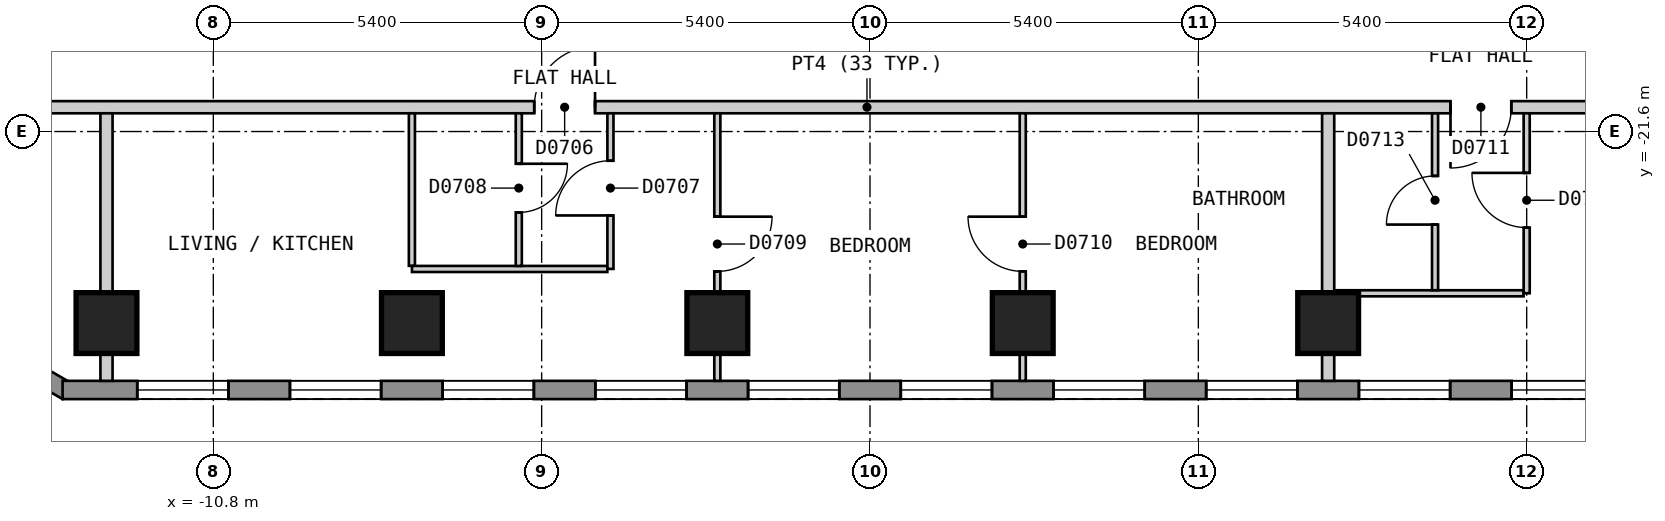
"""IFC4 building model, lengths in metres.
Left out: names, types, materials, properties, quantities, classifications, styles, units other than length and angle.
Written with IfcOpenShell. Run it as: python <this file> out.ifc"""

import sys

from ifc_helpers import new_model, si_unit, direction, frame, frame_2d, origin, origin_2d, place, context, subcontext, project, spatial, polyline, rectangle, outline, extrude, element, fill, save


model = new_model("IFC4")
c1 = context("Model", 3, precision=1e-05, world=origin(), true_north=direction((0.0, 1.0)))
c2 = subcontext(c1, "Body", "Model", "MODEL_VIEW")
j1 = project(units=[si_unit("LENGTHUNIT", "METRE"), si_unit("PLANEANGLEUNIT", "RADIAN")], contexts=[c1])
p1 = place(None, origin())
s1 = spatial("IfcSite", under=j1, at=p1, CompositionType="ELEMENT")
p2 = place(p1, origin())
s2 = spatial("IfcBuilding", under=s1, at=p2, CompositionType="ELEMENT")
p3 = place(p2, frame((0.0, 0.0, 99.0)))
s3 = spatial("IfcBuildingStorey", under=s2, at=p3, CompositionType="ELEMENT", Elevation=99.0)
for number, where, z_axis, x_axis in (
    (1, (-12.557, -24.75, 0.0), (0.0, 0.0, 1.0), (1.0, 0.0, 0.0)),
    (2, (-7.534, -24.75, 0.0), (0.0, 0.0, 1.0), (1.0, 0.0, 0.0)),
    (3, (-2.511, -24.75, 0.0), (0.0, 0.0, 1.0), (1.0, 0.0, 0.0)),
    (4, (2.512, -24.75, 0.0), (0.0, 0.0, 1.0), (1.0, 0.0, 0.0)),
    (5, (7.535, -24.75, 0.0), (0.0, 0.0, 1.0), (1.0, 0.0, 0.0)),
):
    element("IfcColumn", number, at=place(p3, frame(where, z_axis=z_axis, x_axis=x_axis)), inside=s3, PredefinedType="COLUMN", context=c2, shape_type="SweptSolid", body=[
        extrude(rectangle(XDim=1.0, YDim=1.0, at=origin_2d()), origin(), (0.0, 0.0, 1.0), 3.0),
    ])
p4 = place(p3, frame((-17.534, -23.37, 0.0), z_axis=(0.0, 0.0, 1.0), x_axis=(0.866010750942, -0.50002537861, 0.0)))
e6 = element("IfcWall", 6, at=p4, inside=s3, PredefinedType="SOLIDWALL", context=c2, shape_type="SweptSolid", body=[
    extrude(outline(polyline([(0.0, -0.15), (5.0, -0.15), (4.919, 0.15), (0.08, 0.15), (0.0, -0.15)])), origin(), (0.0, 0.0, 1.0), 2.7),
])
p5 = place(p4, frame((0.65, 0.0, 0.15)))
e7 = element("IfcOpeningElement", 7, at=p5, cuts=e6, PredefinedType="OPENING", context=c2, shape_type="SweptSolid", body=[
    extrude(rectangle(XDim=1.2, YDim=2.1, at=frame_2d((0.6, 1.05))), frame((0.0, 0.16, 0.0), z_axis=(0.0, -1.0, 0.0), x_axis=(1.0, 0.0, 0.0)), (0.0, 0.0, 1.0), 0.32),
])
p6 = place(p4, frame((3.15, 0.0, 0.15)))
e8 = element("IfcOpeningElement", 8, at=p6, cuts=e6, PredefinedType="OPENING", context=c2, shape_type="SweptSolid", body=[
    extrude(rectangle(XDim=1.2, YDim=2.1, at=frame_2d((0.6, 1.05))), frame((0.0, 0.16, 0.0), z_axis=(0.0, -1.0, 0.0), x_axis=(1.0, 0.0, 0.0)), (0.0, 0.0, 1.0), 0.32),
])
p7 = place(p3, frame((-13.279, -25.85, 0.0), z_axis=(0.0, 0.0, 1.0), x_axis=(1.0, 0.0, 0.0)))
e9 = element("IfcWall", 9, at=p7, inside=s3, PredefinedType="SOLIDWALL", context=c2, shape_type="SweptSolid", body=[
    extrude(outline(polyline([(0.0, -0.15), (26.558, -0.15), (26.478, 0.15), (0.08, 0.15), (0.0, -0.15)])), origin(), (0.0, 0.0, 1.0), 2.7),
])
p8 = place(p7, frame((1.228, 0.0, 0.15)))
e10 = element("IfcOpeningElement", 10, at=p8, cuts=e9, PredefinedType="OPENING", context=c2, shape_type="SweptSolid", body=[
    extrude(rectangle(XDim=1.5, YDim=2.1, at=frame_2d((0.75, 1.05))), frame((0.0, 0.16, 0.0), z_axis=(0.0, -1.0, 0.0), x_axis=(1.0, 0.0, 0.0)), (0.0, 0.0, 1.0), 0.32),
])
p9 = place(p7, frame((3.739, 0.0, 0.15)))
e11 = element("IfcOpeningElement", 11, at=p9, cuts=e9, PredefinedType="OPENING", context=c2, shape_type="SweptSolid", body=[
    extrude(rectangle(XDim=1.5, YDim=2.1, at=frame_2d((0.75, 1.05))), frame((0.0, 0.16, 0.0), z_axis=(0.0, -1.0, 0.0), x_axis=(1.0, 0.0, 0.0)), (0.0, 0.0, 1.0), 0.32),
])
p10 = place(p7, frame((6.251, 0.0, 0.15)))
e12 = element("IfcOpeningElement", 12, at=p10, cuts=e9, PredefinedType="OPENING", context=c2, shape_type="SweptSolid", body=[
    extrude(rectangle(XDim=1.5, YDim=2.1, at=frame_2d((0.75, 1.05))), frame((0.0, 0.16, 0.0), z_axis=(0.0, -1.0, 0.0), x_axis=(1.0, 0.0, 0.0)), (0.0, 0.0, 1.0), 0.32),
])
p11 = place(p7, frame((8.762, 0.0, 0.15)))
e13 = element("IfcOpeningElement", 13, at=p11, cuts=e9, PredefinedType="OPENING", context=c2, shape_type="SweptSolid", body=[
    extrude(rectangle(XDim=1.5, YDim=2.1, at=frame_2d((0.75, 1.05))), frame((0.0, 0.16, 0.0), z_axis=(0.0, -1.0, 0.0), x_axis=(1.0, 0.0, 0.0)), (0.0, 0.0, 1.0), 0.32),
])
p12 = place(p7, frame((11.274, 0.0, 0.15)))
e14 = element("IfcOpeningElement", 14, at=p12, cuts=e9, PredefinedType="OPENING", context=c2, shape_type="SweptSolid", body=[
    extrude(rectangle(XDim=1.5, YDim=2.1, at=frame_2d((0.75, 1.05))), frame((0.0, 0.16, 0.0), z_axis=(0.0, -1.0, 0.0), x_axis=(1.0, 0.0, 0.0)), (0.0, 0.0, 1.0), 0.32),
])
p13 = place(p7, frame((13.785, 0.0, 0.15)))
e15 = element("IfcOpeningElement", 15, at=p13, cuts=e9, PredefinedType="OPENING", context=c2, shape_type="SweptSolid", body=[
    extrude(rectangle(XDim=1.5, YDim=2.1, at=frame_2d((0.75, 1.05))), frame((0.0, 0.16, 0.0), z_axis=(0.0, -1.0, 0.0), x_axis=(1.0, 0.0, 0.0)), (0.0, 0.0, 1.0), 0.32),
])
p14 = place(p7, frame((16.297, 0.0, 0.15)))
e16 = element("IfcOpeningElement", 16, at=p14, cuts=e9, PredefinedType="OPENING", context=c2, shape_type="SweptSolid", body=[
    extrude(rectangle(XDim=1.5, YDim=2.1, at=frame_2d((0.75, 1.05))), frame((0.0, 0.16, 0.0), z_axis=(0.0, -1.0, 0.0), x_axis=(1.0, 0.0, 0.0)), (0.0, 0.0, 1.0), 0.32),
])
p15 = place(p7, frame((18.808, 0.0, 0.15)))
e17 = element("IfcOpeningElement", 17, at=p15, cuts=e9, PredefinedType="OPENING", context=c2, shape_type="SweptSolid", body=[
    extrude(rectangle(XDim=1.5, YDim=2.1, at=frame_2d((0.75, 1.05))), frame((0.0, 0.16, 0.0), z_axis=(0.0, -1.0, 0.0), x_axis=(1.0, 0.0, 0.0)), (0.0, 0.0, 1.0), 0.32),
])
p16 = place(p7, frame((21.32, 0.0, 0.15)))
e18 = element("IfcOpeningElement", 18, at=p16, cuts=e9, PredefinedType="OPENING", context=c2, shape_type="SweptSolid", body=[
    extrude(rectangle(XDim=1.5, YDim=2.1, at=frame_2d((0.75, 1.05))), frame((0.0, 0.16, 0.0), z_axis=(0.0, -1.0, 0.0), x_axis=(1.0, 0.0, 0.0)), (0.0, 0.0, 1.0), 0.32),
])
p17 = place(p7, frame((23.831, 0.0, 0.15)))
e19 = element("IfcOpeningElement", 19, at=p17, cuts=e9, PredefinedType="OPENING", context=c2, shape_type="SweptSolid", body=[
    extrude(rectangle(XDim=1.5, YDim=2.1, at=frame_2d((0.75, 1.05))), frame((0.0, 0.16, 0.0), z_axis=(0.0, -1.0, 0.0), x_axis=(1.0, 0.0, 0.0)), (0.0, 0.0, 1.0), 0.32),
])
p18 = place(p3, frame((-15.499, -21.2, 0.0), z_axis=(0.0, 0.0, 1.0), x_axis=(1.0, 0.0, 0.0)))
e20 = element("IfcWall", 20, at=p18, inside=s3, PredefinedType="PARTITIONING", context=c2, shape_type="SweptSolid", body=[
    extrude(rectangle(XDim=30.898, YDim=0.2, at=frame_2d((15.449, 0.0))), origin(), (0.0, 0.0, 1.0), 2.7),
])
p19 = place(p18, frame((9.977, 0.0, 0.0)))
e21 = element("IfcOpeningElement", 21, at=p19, cuts=e20, PredefinedType="OPENING", context=c2, shape_type="SweptSolid", body=[
    extrude(rectangle(XDim=1.0, YDim=2.1, at=frame_2d((0.5, 1.05))), frame((0.0, 0.11, 0.0), z_axis=(0.0, -1.0, 0.0), x_axis=(1.0, 0.0, 0.0)), (0.0, 0.0, 1.0), 0.22),
])
p20 = place(p18, frame((25.046, 0.0, 0.0)))
e22 = element("IfcOpeningElement", 22, at=p20, cuts=e20, PredefinedType="OPENING", context=c2, shape_type="SweptSolid", body=[
    extrude(rectangle(XDim=1.0, YDim=2.1, at=frame_2d((0.5, 1.05))), frame((0.0, 0.11, 0.0), z_axis=(0.0, -1.0, 0.0), x_axis=(1.0, 0.0, 0.0)), (0.0, 0.0, 1.0), 0.22),
])
p21 = place(p3, frame((-7.534, -21.3, 0.0), z_axis=(0.0, 0.0, 1.0), x_axis=(0.0, -1.0, 0.0)))
e23 = element("IfcWall", 23, at=p21, inside=s3, PredefinedType="PARTITIONING", context=c2, shape_type="SweptSolid", body=[
    extrude(rectangle(XDim=2.509, YDim=0.1, at=frame_2d((1.254, 0.0))), origin(), (0.0, 0.0, 1.0), 2.7),
])
p22 = place(p3, frame((-2.511, -21.3, 0.0), z_axis=(0.0, 0.0, 1.0), x_axis=(0.0, -1.0, 0.0)))
e24 = element("IfcWall", 24, at=p22, inside=s3, PredefinedType="PARTITIONING", context=c2, shape_type="SweptSolid", body=[
    extrude(rectangle(XDim=4.4, YDim=0.1, at=frame_2d((2.2, 0.0))), origin(), (0.0, 0.0, 1.0), 2.7),
])
p23 = place(p22, frame((1.7, 0.0, 0.0)))
e25 = element("IfcOpeningElement", 25, at=p23, cuts=e24, PredefinedType="OPENING", context=c2, shape_type="SweptSolid", body=[
    extrude(rectangle(XDim=0.9, YDim=2.1, at=frame_2d((0.45, 1.05))), frame((0.0, 0.06, 0.0), z_axis=(0.0, -1.0, 0.0), x_axis=(1.0, 0.0, 0.0)), (0.0, 0.0, 1.0), 0.12),
])
p24 = place(p3, frame((-7.533, -23.86, 0.0), z_axis=(0.0, 0.0, 1.0), x_axis=(1.0, 0.0, 0.0)))
e26 = element("IfcWall", 26, at=p24, inside=s3, PredefinedType="PARTITIONING", context=c2, shape_type="SweptSolid", body=[
    extrude(rectangle(XDim=3.213, YDim=0.1, at=frame_2d((1.606, 0.0))), origin(), (0.0, 0.0, 1.0), 2.7),
])
p25 = place(p3, frame((7.635, -24.26, 0.0), z_axis=(0.0, 0.0, 1.0), x_axis=(1.0, 0.0, 0.0)))
e27 = element("IfcWall", 27, at=p25, inside=s3, PredefinedType="PARTITIONING", context=c2, shape_type="SweptSolid", body=[
    extrude(rectangle(XDim=3.114, YDim=0.1, at=frame_2d((1.557, 0.0))), origin(), (0.0, 0.0, 1.0), 2.7),
])
p26 = place(p3, frame((9.293, -24.21, 0.0), z_axis=(0.0, 0.0, 1.0), x_axis=(0.0, 1.0, 0.0)))
e28 = element("IfcWall", 28, at=p26, inside=s3, PredefinedType="PARTITIONING", context=c2, shape_type="SweptSolid", body=[
    extrude(rectangle(XDim=2.91, YDim=0.1, at=frame_2d((1.455, 0.0))), origin(), (0.0, 0.0, 1.0), 2.7),
])
p27 = place(p26, frame((1.08, 0.0, 0.0)))
e29 = element("IfcOpeningElement", 29, at=p27, cuts=e28, PredefinedType="OPENING", context=c2, shape_type="SweptSolid", body=[
    extrude(rectangle(XDim=0.8, YDim=2.1, at=frame_2d((0.4, 1.05))), frame((0.0, 0.06, 0.0), z_axis=(0.0, -1.0, 0.0), x_axis=(1.0, 0.0, 0.0)), (0.0, 0.0, 1.0), 0.12),
])
p28 = place(p3, frame((10.8, -24.259, 0.0), z_axis=(0.0, 0.0, 1.0), x_axis=(0.0, 1.0, 0.0)))
e30 = element("IfcWall", 30, at=p28, inside=s3, PredefinedType="PARTITIONING", context=c2, shape_type="SweptSolid", body=[
    extrude(rectangle(XDim=2.959, YDim=0.1, at=frame_2d((1.479, 0.0))), origin(), (0.0, 0.0, 1.0), 2.7),
])
p29 = place(p28, frame((1.079, 0.0, 0.0)))
e31 = element("IfcOpeningElement", 31, at=p29, cuts=e30, PredefinedType="OPENING", context=c2, shape_type="SweptSolid", body=[
    extrude(rectangle(XDim=0.9, YDim=2.1, at=frame_2d((0.45, 1.05))), frame((0.0, 0.06, 0.0), z_axis=(0.0, -1.0, 0.0), x_axis=(1.0, 0.0, 0.0)), (0.0, 0.0, 1.0), 0.12),
])
p30 = place(p3, frame((2.512, -25.7, 0.0), z_axis=(0.0, 0.0, 1.0), x_axis=(0.0, 1.0, 0.0)))
e32 = element("IfcWall", 32, at=p30, inside=s3, PredefinedType="PARTITIONING", context=c2, shape_type="SweptSolid", body=[
    extrude(rectangle(XDim=4.4, YDim=0.1, at=frame_2d((2.2, 0.0))), origin(), (0.0, 0.0, 1.0), 2.7),
])
p31 = place(p30, frame((1.8, 0.0, 0.0)))
e33 = element("IfcOpeningElement", 33, at=p31, cuts=e32, PredefinedType="OPENING", context=c2, shape_type="SweptSolid", body=[
    extrude(rectangle(XDim=0.9, YDim=2.1, at=frame_2d((0.45, 1.05))), frame((0.0, 0.06, 0.0), z_axis=(0.0, -1.0, 0.0), x_axis=(1.0, 0.0, 0.0)), (0.0, 0.0, 1.0), 0.12),
])
p32 = place(p3, frame((-4.269, -23.859, 0.0), z_axis=(0.0, 0.0, 1.0), x_axis=(0.0, 1.0, 0.0)))
e34 = element("IfcWall", 34, at=p32, inside=s3, PredefinedType="PARTITIONING", context=c2, shape_type="SweptSolid", body=[
    extrude(rectangle(XDim=2.559, YDim=0.1, at=frame_2d((1.279, 0.0))), origin(), (0.0, 0.0, 1.0), 2.7),
])
p33 = place(p32, frame((0.879, 0.0, 0.0)))
e35 = element("IfcOpeningElement", 35, at=p33, cuts=e34, PredefinedType="OPENING", context=c2, shape_type="SweptSolid", body=[
    extrude(rectangle(XDim=0.9, YDim=2.1, at=frame_2d((0.45, 1.05))), frame((0.0, 0.06, 0.0), z_axis=(0.0, -1.0, 0.0), x_axis=(1.0, 0.0, 0.0)), (0.0, 0.0, 1.0), 0.12),
])
p34 = place(p3, frame((-5.776, -23.81, 0.0), z_axis=(0.0, 0.0, 1.0), x_axis=(0.0, 1.0, 0.0)))
e36 = element("IfcWall", 36, at=p34, inside=s3, PredefinedType="PARTITIONING", context=c2, shape_type="SweptSolid", body=[
    extrude(rectangle(XDim=2.51, YDim=0.1, at=frame_2d((1.255, 0.0))), origin(), (0.0, 0.0, 1.0), 2.7),
])
p35 = place(p34, frame((0.88, 0.0, 0.0)))
e37 = element("IfcOpeningElement", 37, at=p35, cuts=e36, PredefinedType="OPENING", context=c2, shape_type="SweptSolid", body=[
    extrude(rectangle(XDim=0.8, YDim=2.1, at=frame_2d((0.4, 1.05))), frame((0.0, 0.06, 0.0), z_axis=(0.0, -1.0, 0.0), x_axis=(1.0, 0.0, 0.0)), (0.0, 0.0, 1.0), 0.12),
])
p36 = place(p3, frame((7.535, -21.3, 0.0), z_axis=(0.0, 0.0, 1.0), x_axis=(0.0, -1.0, 0.0)))
e38 = element("IfcWall", 38, at=p36, inside=s3, PredefinedType="PARTITIONING", context=c2, shape_type="SweptSolid", body=[
    extrude(rectangle(XDim=2.98, YDim=0.2, at=frame_2d((1.49, 0.0))), origin(), (0.0, 0.0, 1.0), 2.7),
])
p37 = place(p3, frame((7.535, -25.7, 0.0), z_axis=(0.0, 0.0, 1.0), x_axis=(0.0, 1.0, 0.0)))
e39 = element("IfcWall", 39, at=p37, inside=s3, PredefinedType="PARTITIONING", context=c2, shape_type="SweptSolid", body=[
    extrude(rectangle(XDim=1.46, YDim=0.2, at=frame_2d((0.73, 0.0))), origin(), (0.0, 0.0, 1.0), 2.7),
])
p38 = place(p3, frame((-12.557, -25.7, 0.0), z_axis=(0.0, 0.0, 1.0), x_axis=(0.0, 1.0, 0.0)))
e40 = element("IfcWall", 40, at=p38, inside=s3, PredefinedType="PARTITIONING", context=c2, shape_type="SweptSolid", body=[
    extrude(rectangle(XDim=4.4, YDim=0.2, at=frame_2d((2.2, 0.0))), origin(), (0.0, 0.0, 1.0), 2.7),
])
p39 = place(p8, origin())
e41 = element("IfcWindow", 41, at=p39, inside=s3, PartitioningType="SINGLE_PANEL", PredefinedType="WINDOW", context=c2, shape_type="SweptSolid", body=[
    extrude(rectangle(XDim=1.5, YDim=2.1, at=frame_2d((0.75, 1.05))), frame((0.0, 0.03, 0.0), z_axis=(0.0, -1.0, 0.0), x_axis=(1.0, 0.0, 0.0)), (0.0, 0.0, 1.0), 0.06),
])
fill(e10, e41)
p40 = place(p9, origin())
e42 = element("IfcWindow", 42, at=p40, inside=s3, PartitioningType="SINGLE_PANEL", PredefinedType="WINDOW", context=c2, shape_type="SweptSolid", body=[
    extrude(rectangle(XDim=1.5, YDim=2.1, at=frame_2d((0.75, 1.05))), frame((0.0, 0.03, 0.0), z_axis=(0.0, -1.0, 0.0), x_axis=(1.0, 0.0, 0.0)), (0.0, 0.0, 1.0), 0.06),
])
fill(e11, e42)
p41 = place(p10, origin())
e43 = element("IfcWindow", 43, at=p41, inside=s3, PartitioningType="SINGLE_PANEL", PredefinedType="WINDOW", context=c2, shape_type="SweptSolid", body=[
    extrude(rectangle(XDim=1.5, YDim=2.1, at=frame_2d((0.75, 1.05))), frame((0.0, 0.03, 0.0), z_axis=(0.0, -1.0, 0.0), x_axis=(1.0, 0.0, 0.0)), (0.0, 0.0, 1.0), 0.06),
])
fill(e12, e43)
p42 = place(p11, origin())
e44 = element("IfcWindow", 44, at=p42, inside=s3, PartitioningType="SINGLE_PANEL", PredefinedType="WINDOW", context=c2, shape_type="SweptSolid", body=[
    extrude(rectangle(XDim=1.5, YDim=2.1, at=frame_2d((0.75, 1.05))), frame((0.0, 0.03, 0.0), z_axis=(0.0, -1.0, 0.0), x_axis=(1.0, 0.0, 0.0)), (0.0, 0.0, 1.0), 0.06),
])
fill(e13, e44)
p43 = place(p12, origin())
e45 = element("IfcWindow", 45, at=p43, inside=s3, PartitioningType="SINGLE_PANEL", PredefinedType="WINDOW", context=c2, shape_type="SweptSolid", body=[
    extrude(rectangle(XDim=1.5, YDim=2.1, at=frame_2d((0.75, 1.05))), frame((0.0, 0.03, 0.0), z_axis=(0.0, -1.0, 0.0), x_axis=(1.0, 0.0, 0.0)), (0.0, 0.0, 1.0), 0.06),
])
fill(e14, e45)
p44 = place(p13, origin())
e46 = element("IfcWindow", 46, at=p44, inside=s3, PartitioningType="SINGLE_PANEL", PredefinedType="WINDOW", context=c2, shape_type="SweptSolid", body=[
    extrude(rectangle(XDim=1.5, YDim=2.1, at=frame_2d((0.75, 1.05))), frame((0.0, 0.03, 0.0), z_axis=(0.0, -1.0, 0.0), x_axis=(1.0, 0.0, 0.0)), (0.0, 0.0, 1.0), 0.06),
])
fill(e15, e46)
p45 = place(p14, origin())
e47 = element("IfcWindow", 47, at=p45, inside=s3, PartitioningType="SINGLE_PANEL", PredefinedType="WINDOW", context=c2, shape_type="SweptSolid", body=[
    extrude(rectangle(XDim=1.5, YDim=2.1, at=frame_2d((0.75, 1.05))), frame((0.0, 0.03, 0.0), z_axis=(0.0, -1.0, 0.0), x_axis=(1.0, 0.0, 0.0)), (0.0, 0.0, 1.0), 0.06),
])
fill(e16, e47)
p46 = place(p15, origin())
e48 = element("IfcWindow", 48, at=p46, inside=s3, PartitioningType="SINGLE_PANEL", PredefinedType="WINDOW", context=c2, shape_type="SweptSolid", body=[
    extrude(rectangle(XDim=1.5, YDim=2.1, at=frame_2d((0.75, 1.05))), frame((0.0, 0.03, 0.0), z_axis=(0.0, -1.0, 0.0), x_axis=(1.0, 0.0, 0.0)), (0.0, 0.0, 1.0), 0.06),
])
fill(e17, e48)
p47 = place(p16, origin())
e49 = element("IfcWindow", 49, at=p47, inside=s3, PartitioningType="SINGLE_PANEL", PredefinedType="WINDOW", context=c2, shape_type="SweptSolid", body=[
    extrude(rectangle(XDim=1.5, YDim=2.1, at=frame_2d((0.75, 1.05))), frame((0.0, 0.03, 0.0), z_axis=(0.0, -1.0, 0.0), x_axis=(1.0, 0.0, 0.0)), (0.0, 0.0, 1.0), 0.06),
])
fill(e18, e49)
p48 = place(p17, origin())
e50 = element("IfcWindow", 50, at=p48, inside=s3, PartitioningType="SINGLE_PANEL", PredefinedType="WINDOW", context=c2, shape_type="SweptSolid", body=[
    extrude(rectangle(XDim=1.5, YDim=2.1, at=frame_2d((0.75, 1.05))), frame((0.0, 0.03, 0.0), z_axis=(0.0, -1.0, 0.0), x_axis=(1.0, 0.0, 0.0)), (0.0, 0.0, 1.0), 0.06),
])
fill(e19, e50)
p49 = place(p19, origin())
e51 = element("IfcDoor", 51, at=p49, inside=s3, OperationType="SINGLE_SWING_RIGHT", PredefinedType="DOOR", context=c2, shape_type="SweptSolid", body=[
    extrude(rectangle(XDim=1.0, YDim=2.1, at=frame_2d((0.5, 1.05))), frame((0.0, 0.025, 0.0), z_axis=(0.0, -1.0, 0.0), x_axis=(1.0, 0.0, 0.0)), (0.0, 0.0, 1.0), 0.05),
])
fill(e21, e51)
p50 = place(p33, origin())
e52 = element("IfcDoor", 52, at=p50, inside=s3, OperationType="SINGLE_SWING_LEFT", PredefinedType="DOOR", context=c2, shape_type="SweptSolid", body=[
    extrude(rectangle(XDim=0.9, YDim=2.1, at=frame_2d((0.45, 1.05))), frame((0.0, 0.025, 0.0), z_axis=(0.0, -1.0, 0.0), x_axis=(1.0, 0.0, 0.0)), (0.0, 0.0, 1.0), 0.05),
])
fill(e35, e52)
p51 = place(p35, origin())
e53 = element("IfcDoor", 53, at=p51, inside=s3, OperationType="SINGLE_SWING_RIGHT", PredefinedType="DOOR", context=c2, shape_type="SweptSolid", body=[
    extrude(rectangle(XDim=0.8, YDim=2.1, at=frame_2d((0.4, 1.05))), frame((0.0, 0.025, 0.0), z_axis=(0.0, -1.0, 0.0), x_axis=(1.0, 0.0, 0.0)), (0.0, 0.0, 1.0), 0.05),
])
fill(e37, e53)
p52 = place(p23, origin())
e54 = element("IfcDoor", 54, at=p52, inside=s3, OperationType="SINGLE_SWING_LEFT", PredefinedType="DOOR", context=c2, shape_type="SweptSolid", body=[
    extrude(rectangle(XDim=0.9, YDim=2.1, at=frame_2d((0.45, 1.05))), frame((0.0, 0.025, 0.0), z_axis=(0.0, -1.0, 0.0), x_axis=(1.0, 0.0, 0.0)), (0.0, 0.0, 1.0), 0.05),
])
fill(e25, e54)
p53 = place(p31, origin())
e55 = element("IfcDoor", 55, at=p53, inside=s3, OperationType="SINGLE_SWING_RIGHT", PredefinedType="DOOR", context=c2, shape_type="SweptSolid", body=[
    extrude(rectangle(XDim=0.9, YDim=2.1, at=frame_2d((0.45, 1.05))), frame((0.0, 0.025, 0.0), z_axis=(0.0, -1.0, 0.0), x_axis=(1.0, 0.0, 0.0)), (0.0, 0.0, 1.0), 0.05),
])
fill(e33, e55)
p54 = place(p20, origin())
e56 = element("IfcDoor", 56, at=p54, inside=s3, OperationType="SINGLE_SWING_LEFT", PredefinedType="DOOR", context=c2, shape_type="SweptSolid", body=[
    extrude(rectangle(XDim=1.0, YDim=2.1, at=frame_2d((0.5, 1.05))), frame((0.0, 0.025, 0.0), z_axis=(0.0, -1.0, 0.0), x_axis=(1.0, 0.0, 0.0)), (0.0, 0.0, 1.0), 0.05),
])
fill(e22, e56)
p55 = place(p29, origin())
e57 = element("IfcDoor", 57, at=p55, inside=s3, OperationType="SINGLE_SWING_RIGHT", PredefinedType="DOOR", context=c2, shape_type="SweptSolid", body=[
    extrude(rectangle(XDim=0.9, YDim=2.1, at=frame_2d((0.45, 1.05))), frame((0.0, 0.025, 0.0), z_axis=(0.0, -1.0, 0.0), x_axis=(1.0, 0.0, 0.0)), (0.0, 0.0, 1.0), 0.05),
])
fill(e31, e57)
p56 = place(p27, origin())
e58 = element("IfcDoor", 58, at=p56, inside=s3, OperationType="SINGLE_SWING_LEFT", PredefinedType="DOOR", context=c2, shape_type="SweptSolid", body=[
    extrude(rectangle(XDim=0.8, YDim=2.1, at=frame_2d((0.4, 1.05))), frame((0.0, 0.025, 0.0), z_axis=(0.0, -1.0, 0.0), x_axis=(1.0, 0.0, 0.0)), (0.0, 0.0, 1.0), 0.05),
])
fill(e29, e58)
save(model, sys.argv[1])
